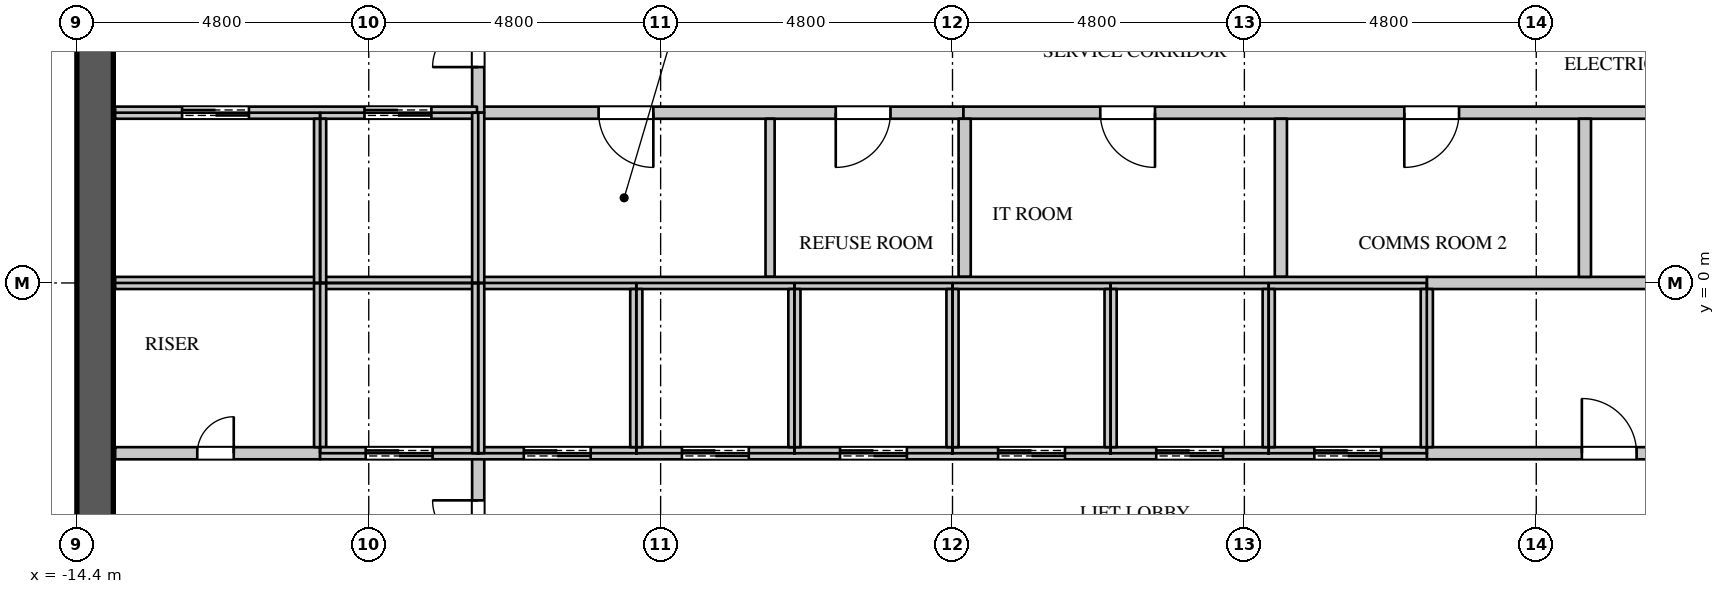
"""IFC4 building model, lengths in metres.
Left out: names, types, materials, properties, quantities, classifications, styles, units other than length and angle.
Written with IfcOpenShell. Run it as: python <this file> out.ifc"""

import sys

from ifc_helpers import new_model, si_unit, direction, frame, frame_2d, origin, place, context, subcontext, project, spatial, rectangle, extrude, element, fill, save


model = new_model("IFC4")
c1 = context("Model", 3, precision=1e-05, world=origin(), true_north=direction((0.0, 1.0)))
c2 = subcontext(c1, "Body", "Model", "MODEL_VIEW")
j1 = project(units=[si_unit("LENGTHUNIT", "METRE"), si_unit("PLANEANGLEUNIT", "RADIAN")], contexts=[c1])
p1 = place(None, origin())
s1 = spatial("IfcSite", under=j1, at=p1, CompositionType="ELEMENT")
p2 = place(p1, origin())
s2 = spatial("IfcBuilding", under=s1, at=p2, CompositionType="ELEMENT")
p3 = place(p2, frame((0.0, 0.0, 260.1)))
s3 = spatial("IfcBuildingStorey", under=s2, at=p3, CompositionType="ELEMENT", Elevation=260.1)
p4 = place(p3, frame((-14.1, -11.4, 0.0), z_axis=(0.0, 0.0, 1.0), x_axis=(0.0, 1.0, 0.0)))
e1 = element("IfcWall", 1, at=p4, inside=s3, PredefinedType="SHEAR", context=c2, shape_type="SweptSolid", body=[
    extrude(rectangle(XDim=22.8, YDim=0.6, at=frame_2d((11.4, 0.0))), origin(), (0.0, 0.0, 1.0), 4.2),
])
p5 = place(p4, frame((20.45, 0.0, 0.0)))
e2 = element("IfcOpeningElement", 2, at=p5, cuts=e1, PredefinedType="OPENING", context=c2, shape_type="SweptSolid", body=[
    extrude(rectangle(XDim=1.1, YDim=2.2, at=frame_2d((0.55, 1.1))), frame((0.0, 0.31, 0.0), z_axis=(0.0, -1.0, 0.0), x_axis=(1.0, 0.0, 0.0)), (0.0, 0.0, 1.0), 0.62),
])
p6 = place(p4, frame((1.25, 0.0, 0.0)))
e3 = element("IfcOpeningElement", 3, at=p6, cuts=e1, PredefinedType="OPENING", context=c2, shape_type="SweptSolid", body=[
    extrude(rectangle(XDim=1.1, YDim=2.2, at=frame_2d((0.55, 1.1))), frame((0.0, 0.31, 0.0), z_axis=(0.0, -1.0, 0.0), x_axis=(1.0, 0.0, 0.0)), (0.0, 0.0, 1.0), 0.62),
])
p7 = place(p4, frame((16.15, 0.0, 0.0)))
e4 = element("IfcOpeningElement", 4, at=p7, cuts=e1, PredefinedType="OPENING", context=c2, shape_type="SweptSolid", body=[
    extrude(rectangle(XDim=1.5, YDim=2.4, at=frame_2d((0.75, 1.2))), frame((0.0, 0.31, 0.0), z_axis=(0.0, -1.0, 0.0), x_axis=(1.0, 0.0, 0.0)), (0.0, 0.0, 1.0), 0.62),
])
p8 = place(p4, frame((5.15, 0.0, 0.0)))
e5 = element("IfcOpeningElement", 5, at=p8, cuts=e1, PredefinedType="OPENING", context=c2, shape_type="SweptSolid", body=[
    extrude(rectangle(XDim=1.5, YDim=2.4, at=frame_2d((0.75, 1.2))), frame((0.0, 0.31, 0.0), z_axis=(0.0, -1.0, 0.0), x_axis=(1.0, 0.0, 0.0)), (0.0, 0.0, 1.0), 0.62),
])
p9 = place(p3, frame((-7.82, 2.8, 0.0), z_axis=(0.0, 0.0, 1.0), x_axis=(1.0, 0.0, 0.0)))
e6 = element("IfcWall", 6, at=p9, inside=s3, PredefinedType="PARTITIONING", context=c2, shape_type="SweptSolid", body=[
    extrude(rectangle(XDim=8.0, YDim=0.2, at=frame_2d((4.0, 0.0))), origin(), (0.0, 0.0, 1.0), 3.95),
])
p10 = place(p9, frame((2.0, 0.0, 0.0)))
e7 = element("IfcOpeningElement", 7, at=p10, cuts=e6, PredefinedType="OPENING", context=c2, shape_type="SweptSolid", body=[
    extrude(rectangle(XDim=0.9, YDim=2.2, at=frame_2d((0.45, 1.1))), frame((0.0, 0.11, 0.0), z_axis=(0.0, -1.0, 0.0), x_axis=(1.0, 0.0, 0.0)), (0.0, 0.0, 1.0), 0.22),
])
p11 = place(p9, frame((5.9, 0.0, 0.0)))
e8 = element("IfcOpeningElement", 8, at=p11, cuts=e6, PredefinedType="OPENING", context=c2, shape_type="SweptSolid", body=[
    extrude(rectangle(XDim=0.9, YDim=2.2, at=frame_2d((0.45, 1.1))), frame((0.0, 0.11, 0.0), z_axis=(0.0, -1.0, 0.0), x_axis=(1.0, 0.0, 0.0)), (0.0, 0.0, 1.0), 0.22),
])
p12 = place(p3, frame((-7.8, -8.075, 0.0), z_axis=(0.0, 0.0, 1.0), x_axis=(0.0, 1.0, 0.0)))
e9 = element("IfcWall", 9, at=p12, inside=s3, PredefinedType="PARTITIONING", context=c2, shape_type="SweptSolid", body=[
    extrude(rectangle(XDim=5.275, YDim=0.2, at=frame_2d((2.637, 0.0))), origin(), (0.0, 0.0, 1.0), 3.95),
])
p13 = place(p12, frame((3.0, 0.0, 0.0)))
e10 = element("IfcOpeningElement", 10, at=p13, cuts=e9, PredefinedType="OPENING", context=c2, shape_type="SweptSolid", body=[
    extrude(rectangle(XDim=1.5, YDim=2.4, at=frame_2d((0.75, 1.2))), frame((0.0, 0.11, 0.0), z_axis=(0.0, -1.0, 0.0), x_axis=(1.0, 0.0, 0.0)), (0.0, 0.0, 1.0), 0.22),
])
p14 = place(p3, frame((-7.8, 2.8, 0.0), z_axis=(0.0, 0.0, 1.0), x_axis=(0.0, 1.0, 0.0)))
e11 = element("IfcWall", 11, at=p14, inside=s3, PredefinedType="PARTITIONING", context=c2, shape_type="SweptSolid", body=[
    extrude(rectangle(XDim=5.275, YDim=0.2, at=frame_2d((2.637, 0.0))), origin(), (0.0, 0.0, 1.0), 3.95),
])
p15 = place(p14, frame((0.75, 0.0, 0.0)))
e12 = element("IfcOpeningElement", 12, at=p15, cuts=e11, PredefinedType="OPENING", context=c2, shape_type="SweptSolid", body=[
    extrude(rectangle(XDim=1.5, YDim=2.4, at=frame_2d((0.75, 1.2))), frame((0.0, 0.11, 0.0), z_axis=(0.0, -1.0, 0.0), x_axis=(1.0, 0.0, 0.0)), (0.0, 0.0, 1.0), 0.22),
])
p16 = place(p3, frame((-3.0, 0.1, 0.0), z_axis=(0.0, 0.0, 1.0), x_axis=(0.0, 1.0, 0.0)))
e13 = element("IfcWall", 13, at=p16, inside=s3, PredefinedType="PARTITIONING", context=c2, shape_type="SweptSolid", body=[
    extrude(rectangle(XDim=2.6, YDim=0.15, at=frame_2d((1.3, 0.0))), origin(), (0.0, 0.0, 1.0), 3.95),
])
p17 = place(p3, frame((-13.77, -2.8, 0.0), z_axis=(0.0, 0.0, 1.0), x_axis=(1.0, 0.0, 0.0)))
e14 = element("IfcWall", 14, at=p17, inside=s3, PredefinedType="PARTITIONING", context=c2, shape_type="SweptSolid", body=[
    extrude(rectangle(XDim=3.37, YDim=0.2, at=frame_2d((1.685, 0.0))), origin(), (0.0, 0.0, 1.0), 3.95),
])
p18 = place(p17, frame((1.35, 0.0, 0.0)))
e15 = element("IfcOpeningElement", 15, at=p18, cuts=e14, PredefinedType="OPENING", context=c2, shape_type="SweptSolid", body=[
    extrude(rectangle(XDim=0.6, YDim=2.0, at=frame_2d((0.3, 1.0))), frame((0.0, 0.11, 0.0), z_axis=(0.0, -1.0, 0.0), x_axis=(1.0, 0.0, 0.0)), (0.0, 0.0, 1.0), 0.22),
])
p19 = place(p3, frame((0.18, 2.8, 0.0), z_axis=(0.0, 0.0, 1.0), x_axis=(1.0, 0.0, 0.0)))
e16 = element("IfcWall", 16, at=p19, inside=s3, PredefinedType="PARTITIONING", context=c2, shape_type="SweptSolid", body=[
    extrude(rectangle(XDim=13.59, YDim=0.2, at=frame_2d((6.795, 0.0))), origin(), (0.0, 0.0, 1.0), 3.95),
])
p20 = place(p19, frame((11.55, 0.0, 0.0)))
e17 = element("IfcOpeningElement", 17, at=p20, cuts=e16, PredefinedType="OPENING", context=c2, shape_type="SweptSolid", body=[
    extrude(rectangle(XDim=0.6, YDim=2.0, at=frame_2d((0.3, 1.0))), frame((0.0, 0.11, 0.0), z_axis=(0.0, -1.0, 0.0), x_axis=(1.0, 0.0, 0.0)), (0.0, 0.0, 1.0), 0.22),
])
p21 = place(p19, frame((2.25, 0.0, 0.0)))
e18 = element("IfcOpeningElement", 18, at=p21, cuts=e16, PredefinedType="OPENING", context=c2, shape_type="SweptSolid", body=[
    extrude(rectangle(XDim=0.9, YDim=2.2, at=frame_2d((0.45, 1.1))), frame((0.0, 0.11, 0.0), z_axis=(0.0, -1.0, 0.0), x_axis=(1.0, 0.0, 0.0)), (0.0, 0.0, 1.0), 0.22),
])
p22 = place(p19, frame((7.25, 0.0, 0.0)))
e19 = element("IfcOpeningElement", 19, at=p22, cuts=e16, PredefinedType="OPENING", context=c2, shape_type="SweptSolid", body=[
    extrude(rectangle(XDim=0.9, YDim=2.2, at=frame_2d((0.45, 1.1))), frame((0.0, 0.11, 0.0), z_axis=(0.0, -1.0, 0.0), x_axis=(1.0, 0.0, 0.0)), (0.0, 0.0, 1.0), 0.22),
])
for number, where, z_axis, x_axis in (
    (20, (0.2, 0.1, 0.0), (0.0, 0.0, 1.0), (0.0, 1.0, 0.0)),
    (21, (5.4, 0.1, 0.0), (0.0, 0.0, 1.0), (0.0, 1.0, 0.0)),
):
    element("IfcWall", number, at=place(p3, frame(where, z_axis=z_axis, x_axis=x_axis)), inside=s3, PredefinedType="PARTITIONING", context=c2, shape_type="SweptSolid", body=[
        extrude(rectangle(XDim=2.6, YDim=0.2, at=frame_2d((1.3, 0.0))), origin(), (0.0, 0.0, 1.0), 3.95),
    ])
p23 = place(p3, frame((7.8, -2.8, 0.0), z_axis=(0.0, 0.0, 1.0), x_axis=(1.0, 0.0, 0.0)))
e22 = element("IfcWall", 22, at=p23, inside=s3, PredefinedType="PARTITIONING", context=c2, shape_type="SweptSolid", body=[
    extrude(rectangle(XDim=5.97, YDim=0.2, at=frame_2d((2.985, 0.0))), origin(), (0.0, 0.0, 1.0), 3.95),
])
p24 = place(p23, frame((2.55, 0.0, 0.0)))
e23 = element("IfcOpeningElement", 23, at=p24, cuts=e22, PredefinedType="OPENING", context=c2, shape_type="SweptSolid", body=[
    extrude(rectangle(XDim=0.9, YDim=2.2, at=frame_2d((0.45, 1.1))), frame((0.0, 0.11, 0.0), z_axis=(0.0, -1.0, 0.0), x_axis=(1.0, 0.0, 0.0)), (0.0, 0.0, 1.0), 0.22),
])
p25 = place(p3, frame((7.8, 0.0, 0.0), z_axis=(0.0, 0.0, 1.0), x_axis=(1.0, 0.0, 0.0)))
e24 = element("IfcWall", 24, at=p25, inside=s3, PredefinedType="PARTITIONING", context=c2, shape_type="SweptSolid", body=[
    extrude(rectangle(XDim=5.97, YDim=0.2, at=frame_2d((2.985, 0.0))), origin(), (0.0, 0.0, 1.0), 3.95),
])
p26 = place(p3, frame((10.4, 0.1, 0.0), z_axis=(0.0, 0.0, 1.0), x_axis=(0.0, 1.0, 0.0)))
e25 = element("IfcWall", 25, at=p26, inside=s3, PredefinedType="PARTITIONING", context=c2, shape_type="SweptSolid", body=[
    extrude(rectangle(XDim=2.6, YDim=0.2, at=frame_2d((1.3, 0.0))), origin(), (0.0, 0.0, 1.0), 3.95),
])
p27 = place(p3, frame((-13.77, 0.0, 0.0), z_axis=(0.0, 0.0, 1.0), x_axis=(1.0, 0.0, 0.0)))
e26 = element("IfcWall", 26, at=p27, inside=s3, PredefinedType="PARTITIONING", context=c2, shape_type="SweptSolid", body=[
    extrude(rectangle(XDim=21.57, YDim=0.2, at=frame_2d((10.785, 0.0))), origin(), (0.0, 0.0, 1.0), 3.95),
])
p28 = place(p3, frame((-13.77, 2.8, 0.0), z_axis=(0.0, 0.0, 1.0), x_axis=(1.0, 0.0, 0.0)))
e27 = element("IfcWall", 27, at=p28, inside=s3, PredefinedType="PARTITIONING", context=c2, shape_type="SweptSolid", body=[
    extrude(rectangle(XDim=5.95, YDim=0.2, at=frame_2d((2.975, 0.0))), origin(), (0.0, 0.0, 1.0), 3.95),
])
p29 = place(p28, frame((1.1, 0.0, 0.0)))
e28 = element("IfcOpeningElement", 28, at=p29, cuts=e27, PredefinedType="OPENING", context=c2, shape_type="SweptSolid", body=[
    extrude(rectangle(XDim=1.1, YDim=2.2, at=frame_2d((0.55, 1.1))), frame((0.0, 0.11, 0.0), z_axis=(0.0, -1.0, 0.0), x_axis=(1.0, 0.0, 0.0)), (0.0, 0.0, 1.0), 0.22),
])
p30 = place(p28, frame((4.1, 0.0, 0.0)))
e29 = element("IfcOpeningElement", 29, at=p30, cuts=e27, PredefinedType="OPENING", context=c2, shape_type="SweptSolid", body=[
    extrude(rectangle(XDim=1.1, YDim=2.2, at=frame_2d((0.55, 1.1))), frame((0.0, 0.11, 0.0), z_axis=(0.0, -1.0, 0.0), x_axis=(1.0, 0.0, 0.0)), (0.0, 0.0, 1.0), 0.22),
])
p31 = place(p3, frame((-10.4, -2.7, 0.0), z_axis=(0.0, 0.0, 1.0), x_axis=(0.0, 1.0, 0.0)))
e30 = element("IfcWall", 30, at=p31, inside=s3, PredefinedType="PARTITIONING", context=c2, shape_type="SweptSolid", body=[
    extrude(rectangle(XDim=2.7, YDim=0.2, at=frame_2d((1.35, 0.0))), origin(), (0.0, 0.0, 1.0), 3.95),
])
p32 = place(p3, frame((-10.4, -2.8, 0.0), z_axis=(0.0, 0.0, 1.0), x_axis=(1.0, 0.0, 0.0)))
e31 = element("IfcWall", 31, at=p32, inside=s3, PredefinedType="PARTITIONING", context=c2, shape_type="SweptSolid", body=[
    extrude(rectangle(XDim=18.2, YDim=0.2, at=frame_2d((9.1, 0.0))), origin(), (0.0, 0.0, 1.0), 3.95),
])
p33 = place(p32, frame((0.75, 0.0, 0.0)))
e32 = element("IfcOpeningElement", 32, at=p33, cuts=e31, PredefinedType="OPENING", context=c2, shape_type="SweptSolid", body=[
    extrude(rectangle(XDim=1.1, YDim=2.2, at=frame_2d((0.55, 1.1))), frame((0.0, 0.11, 0.0), z_axis=(0.0, -1.0, 0.0), x_axis=(1.0, 0.0, 0.0)), (0.0, 0.0, 1.0), 0.22),
])
p34 = place(p32, frame((3.35, 0.0, 0.0)))
e33 = element("IfcOpeningElement", 33, at=p34, cuts=e31, PredefinedType="OPENING", context=c2, shape_type="SweptSolid", body=[
    extrude(rectangle(XDim=1.1, YDim=2.2, at=frame_2d((0.55, 1.1))), frame((0.0, 0.11, 0.0), z_axis=(0.0, -1.0, 0.0), x_axis=(1.0, 0.0, 0.0)), (0.0, 0.0, 1.0), 0.22),
])
p35 = place(p32, frame((5.95, 0.0, 0.0)))
e34 = element("IfcOpeningElement", 34, at=p35, cuts=e31, PredefinedType="OPENING", context=c2, shape_type="SweptSolid", body=[
    extrude(rectangle(XDim=1.1, YDim=2.2, at=frame_2d((0.55, 1.1))), frame((0.0, 0.11, 0.0), z_axis=(0.0, -1.0, 0.0), x_axis=(1.0, 0.0, 0.0)), (0.0, 0.0, 1.0), 0.22),
])
p36 = place(p32, frame((8.55, 0.0, 0.0)))
e35 = element("IfcOpeningElement", 35, at=p36, cuts=e31, PredefinedType="OPENING", context=c2, shape_type="SweptSolid", body=[
    extrude(rectangle(XDim=1.1, YDim=2.2, at=frame_2d((0.55, 1.1))), frame((0.0, 0.11, 0.0), z_axis=(0.0, -1.0, 0.0), x_axis=(1.0, 0.0, 0.0)), (0.0, 0.0, 1.0), 0.22),
])
p37 = place(p32, frame((11.15, 0.0, 0.0)))
e36 = element("IfcOpeningElement", 36, at=p37, cuts=e31, PredefinedType="OPENING", context=c2, shape_type="SweptSolid", body=[
    extrude(rectangle(XDim=1.1, YDim=2.2, at=frame_2d((0.55, 1.1))), frame((0.0, 0.11, 0.0), z_axis=(0.0, -1.0, 0.0), x_axis=(1.0, 0.0, 0.0)), (0.0, 0.0, 1.0), 0.22),
])
p38 = place(p32, frame((13.75, 0.0, 0.0)))
e37 = element("IfcOpeningElement", 37, at=p38, cuts=e31, PredefinedType="OPENING", context=c2, shape_type="SweptSolid", body=[
    extrude(rectangle(XDim=1.1, YDim=2.2, at=frame_2d((0.55, 1.1))), frame((0.0, 0.11, 0.0), z_axis=(0.0, -1.0, 0.0), x_axis=(1.0, 0.0, 0.0)), (0.0, 0.0, 1.0), 0.22),
])
p39 = place(p32, frame((16.35, 0.0, 0.0)))
e38 = element("IfcOpeningElement", 38, at=p39, cuts=e31, PredefinedType="OPENING", context=c2, shape_type="SweptSolid", body=[
    extrude(rectangle(XDim=1.1, YDim=2.2, at=frame_2d((0.55, 1.1))), frame((0.0, 0.11, 0.0), z_axis=(0.0, -1.0, 0.0), x_axis=(1.0, 0.0, 0.0)), (0.0, 0.0, 1.0), 0.22),
])
p40 = place(p3, frame((-10.4, 0.0, 0.0), z_axis=(0.0, 0.0, 1.0), x_axis=(0.0, 1.0, 0.0)))
e39 = element("IfcWall", 39, at=p40, inside=s3, PredefinedType="PARTITIONING", context=c2, shape_type="SweptSolid", body=[
    extrude(rectangle(XDim=2.7, YDim=0.2, at=frame_2d((1.35, 0.0))), origin(), (0.0, 0.0, 1.0), 3.95),
])
for number, where, z_axis, x_axis in (
    (40, (-7.8, -2.8, 0.0), (0.0, 0.0, 1.0), (0.0, 1.0, 0.0)),
    (41, (-7.8, 0.0, 0.0), (0.0, 0.0, 1.0), (0.0, 1.0, 0.0)),
):
    element("IfcWall", number, at=place(p3, frame(where, z_axis=z_axis, x_axis=x_axis)), inside=s3, PredefinedType="PARTITIONING", context=c2, shape_type="SweptSolid", body=[
        extrude(rectangle(XDim=2.8, YDim=0.2, at=frame_2d((1.4, 0.0))), origin(), (0.0, 0.0, 1.0), 3.95),
    ])
for number, where, z_axis, x_axis in (
    (42, (-5.2, -2.7, 0.0), (0.0, 0.0, 1.0), (0.0, 1.0, 0.0)),
    (43, (-2.6, -2.7, 0.0), (0.0, 0.0, 1.0), (0.0, 1.0, 0.0)),
    (44, (0.0, -2.7, 0.0), (0.0, 0.0, 1.0), (0.0, 1.0, 0.0)),
    (45, (2.6, -2.7, 0.0), (0.0, 0.0, 1.0), (0.0, 1.0, 0.0)),
    (46, (5.2, -2.7, 0.0), (0.0, 0.0, 1.0), (0.0, 1.0, 0.0)),
    (47, (7.8, -2.7, 0.0), (0.0, 0.0, 1.0), (0.0, 1.0, 0.0)),
):
    element("IfcWall", number, at=place(p3, frame(where, z_axis=z_axis, x_axis=x_axis)), inside=s3, PredefinedType="PARTITIONING", context=c2, shape_type="SweptSolid", body=[
        extrude(rectangle(XDim=2.6, YDim=0.2, at=frame_2d((1.3, 0.0))), origin(), (0.0, 0.0, 1.0), 3.95),
    ])
p41 = place(p18, origin())
e48 = element("IfcDoor", 48, at=p41, inside=s3, OperationType="SINGLE_SWING_RIGHT", PredefinedType="DOOR", context=c2, shape_type="SweptSolid", body=[
    extrude(rectangle(XDim=0.6, YDim=2.0, at=frame_2d((0.3, 1.0))), frame((0.0, 0.025, 0.0), z_axis=(0.0, -1.0, 0.0), x_axis=(1.0, 0.0, 0.0)), (0.0, 0.0, 1.0), 0.05),
])
fill(e15, e48)
p42 = place(p24, origin())
e49 = element("IfcDoor", 49, at=p42, inside=s3, OperationType="SINGLE_SWING_LEFT", PredefinedType="DOOR", context=c2, shape_type="SweptSolid", body=[
    extrude(rectangle(XDim=0.9, YDim=2.2, at=frame_2d((0.45, 1.1))), frame((0.0, 0.025, 0.0), z_axis=(0.0, -1.0, 0.0), x_axis=(1.0, 0.0, 0.0)), (0.0, 0.0, 1.0), 0.05),
])
fill(e23, e49)
p43 = place(p10, origin())
e50 = element("IfcDoor", 50, at=p43, inside=s3, OperationType="SINGLE_SWING_LEFT", PredefinedType="DOOR", context=c2, shape_type="SweptSolid", body=[
    extrude(rectangle(XDim=0.9, YDim=2.2, at=frame_2d((0.45, 1.1))), frame((0.0, 0.025, 0.0), z_axis=(0.0, -1.0, 0.0), x_axis=(1.0, 0.0, 0.0)), (0.0, 0.0, 1.0), 0.05),
])
fill(e7, e50)
p44 = place(p11, origin())
e51 = element("IfcDoor", 51, at=p44, inside=s3, OperationType="SINGLE_SWING_RIGHT", PredefinedType="DOOR", context=c2, shape_type="SweptSolid", body=[
    extrude(rectangle(XDim=0.9, YDim=2.2, at=frame_2d((0.45, 1.1))), frame((0.0, 0.025, 0.0), z_axis=(0.0, -1.0, 0.0), x_axis=(1.0, 0.0, 0.0)), (0.0, 0.0, 1.0), 0.05),
])
fill(e8, e51)
p45 = place(p21, origin())
e52 = element("IfcDoor", 52, at=p45, inside=s3, OperationType="SINGLE_SWING_LEFT", PredefinedType="DOOR", context=c2, shape_type="SweptSolid", body=[
    extrude(rectangle(XDim=0.9, YDim=2.2, at=frame_2d((0.45, 1.1))), frame((0.0, 0.025, 0.0), z_axis=(0.0, -1.0, 0.0), x_axis=(1.0, 0.0, 0.0)), (0.0, 0.0, 1.0), 0.05),
])
fill(e18, e52)
p46 = place(p22, origin())
e53 = element("IfcDoor", 53, at=p46, inside=s3, OperationType="SINGLE_SWING_RIGHT", PredefinedType="DOOR", context=c2, shape_type="SweptSolid", body=[
    extrude(rectangle(XDim=0.9, YDim=2.2, at=frame_2d((0.45, 1.1))), frame((0.0, 0.025, 0.0), z_axis=(0.0, -1.0, 0.0), x_axis=(1.0, 0.0, 0.0)), (0.0, 0.0, 1.0), 0.05),
])
fill(e19, e53)
p47 = place(p29, origin())
e54 = element("IfcDoor", 54, at=p47, inside=s3, OperationType="DOUBLE_DOOR_SLIDING", PredefinedType="DOOR", context=c2, shape_type="SweptSolid", body=[
    extrude(rectangle(XDim=1.1, YDim=2.2, at=frame_2d((0.55, 1.1))), frame((0.0, 0.025, 0.0), z_axis=(0.0, -1.0, 0.0), x_axis=(1.0, 0.0, 0.0)), (0.0, 0.0, 1.0), 0.05),
])
fill(e28, e54)
p48 = place(p30, origin())
e55 = element("IfcDoor", 55, at=p48, inside=s3, OperationType="DOUBLE_DOOR_SLIDING", PredefinedType="DOOR", context=c2, shape_type="SweptSolid", body=[
    extrude(rectangle(XDim=1.1, YDim=2.2, at=frame_2d((0.55, 1.1))), frame((0.0, 0.025, 0.0), z_axis=(0.0, -1.0, 0.0), x_axis=(1.0, 0.0, 0.0)), (0.0, 0.0, 1.0), 0.05),
])
fill(e29, e55)
p49 = place(p33, origin())
e56 = element("IfcDoor", 56, at=p49, inside=s3, OperationType="DOUBLE_DOOR_SLIDING", PredefinedType="DOOR", context=c2, shape_type="SweptSolid", body=[
    extrude(rectangle(XDim=1.1, YDim=2.2, at=frame_2d((0.55, 1.1))), frame((0.0, 0.025, 0.0), z_axis=(0.0, -1.0, 0.0), x_axis=(1.0, 0.0, 0.0)), (0.0, 0.0, 1.0), 0.05),
])
fill(e32, e56)
p50 = place(p34, origin())
e57 = element("IfcDoor", 57, at=p50, inside=s3, OperationType="DOUBLE_DOOR_SLIDING", PredefinedType="DOOR", context=c2, shape_type="SweptSolid", body=[
    extrude(rectangle(XDim=1.1, YDim=2.2, at=frame_2d((0.55, 1.1))), frame((0.0, 0.025, 0.0), z_axis=(0.0, -1.0, 0.0), x_axis=(1.0, 0.0, 0.0)), (0.0, 0.0, 1.0), 0.05),
])
fill(e33, e57)
p51 = place(p35, origin())
e58 = element("IfcDoor", 58, at=p51, inside=s3, OperationType="DOUBLE_DOOR_SLIDING", PredefinedType="DOOR", context=c2, shape_type="SweptSolid", body=[
    extrude(rectangle(XDim=1.1, YDim=2.2, at=frame_2d((0.55, 1.1))), frame((0.0, 0.025, 0.0), z_axis=(0.0, -1.0, 0.0), x_axis=(1.0, 0.0, 0.0)), (0.0, 0.0, 1.0), 0.05),
])
fill(e34, e58)
p52 = place(p36, origin())
e59 = element("IfcDoor", 59, at=p52, inside=s3, OperationType="DOUBLE_DOOR_SLIDING", PredefinedType="DOOR", context=c2, shape_type="SweptSolid", body=[
    extrude(rectangle(XDim=1.1, YDim=2.2, at=frame_2d((0.55, 1.1))), frame((0.0, 0.025, 0.0), z_axis=(0.0, -1.0, 0.0), x_axis=(1.0, 0.0, 0.0)), (0.0, 0.0, 1.0), 0.05),
])
fill(e35, e59)
p53 = place(p37, origin())
e60 = element("IfcDoor", 60, at=p53, inside=s3, OperationType="DOUBLE_DOOR_SLIDING", PredefinedType="DOOR", context=c2, shape_type="SweptSolid", body=[
    extrude(rectangle(XDim=1.1, YDim=2.2, at=frame_2d((0.55, 1.1))), frame((0.0, 0.025, 0.0), z_axis=(0.0, -1.0, 0.0), x_axis=(1.0, 0.0, 0.0)), (0.0, 0.0, 1.0), 0.05),
])
fill(e36, e60)
p54 = place(p38, origin())
e61 = element("IfcDoor", 61, at=p54, inside=s3, OperationType="DOUBLE_DOOR_SLIDING", PredefinedType="DOOR", context=c2, shape_type="SweptSolid", body=[
    extrude(rectangle(XDim=1.1, YDim=2.2, at=frame_2d((0.55, 1.1))), frame((0.0, 0.025, 0.0), z_axis=(0.0, -1.0, 0.0), x_axis=(1.0, 0.0, 0.0)), (0.0, 0.0, 1.0), 0.05),
])
fill(e37, e61)
p55 = place(p39, origin())
e62 = element("IfcDoor", 62, at=p55, inside=s3, OperationType="DOUBLE_DOOR_SLIDING", PredefinedType="DOOR", context=c2, shape_type="SweptSolid", body=[
    extrude(rectangle(XDim=1.1, YDim=2.2, at=frame_2d((0.55, 1.1))), frame((0.0, 0.025, 0.0), z_axis=(0.0, -1.0, 0.0), x_axis=(1.0, 0.0, 0.0)), (0.0, 0.0, 1.0), 0.05),
])
fill(e38, e62)
p56 = place(p15, origin())
e63 = element("IfcDoor", 63, at=p56, inside=s3, OperationType="DOUBLE_DOOR_SINGLE_SWING", PredefinedType="DOOR", context=c2, shape_type="SweptSolid", body=[
    extrude(rectangle(XDim=1.5, YDim=2.4, at=frame_2d((0.75, 1.2))), frame((0.0, 0.025, 0.0), z_axis=(0.0, -1.0, 0.0), x_axis=(1.0, 0.0, 0.0)), (0.0, 0.0, 1.0), 0.05),
])
fill(e12, e63)
p57 = place(p13, origin())
e64 = element("IfcDoor", 64, at=p57, inside=s3, OperationType="DOUBLE_DOOR_SINGLE_SWING", PredefinedType="DOOR", context=c2, shape_type="SweptSolid", body=[
    extrude(rectangle(XDim=1.5, YDim=2.4, at=frame_2d((0.75, 1.2))), frame((0.0, 0.025, 0.0), z_axis=(0.0, -1.0, 0.0), x_axis=(1.0, 0.0, 0.0)), (0.0, 0.0, 1.0), 0.05),
])
fill(e10, e64)
save(model, sys.argv[1])
